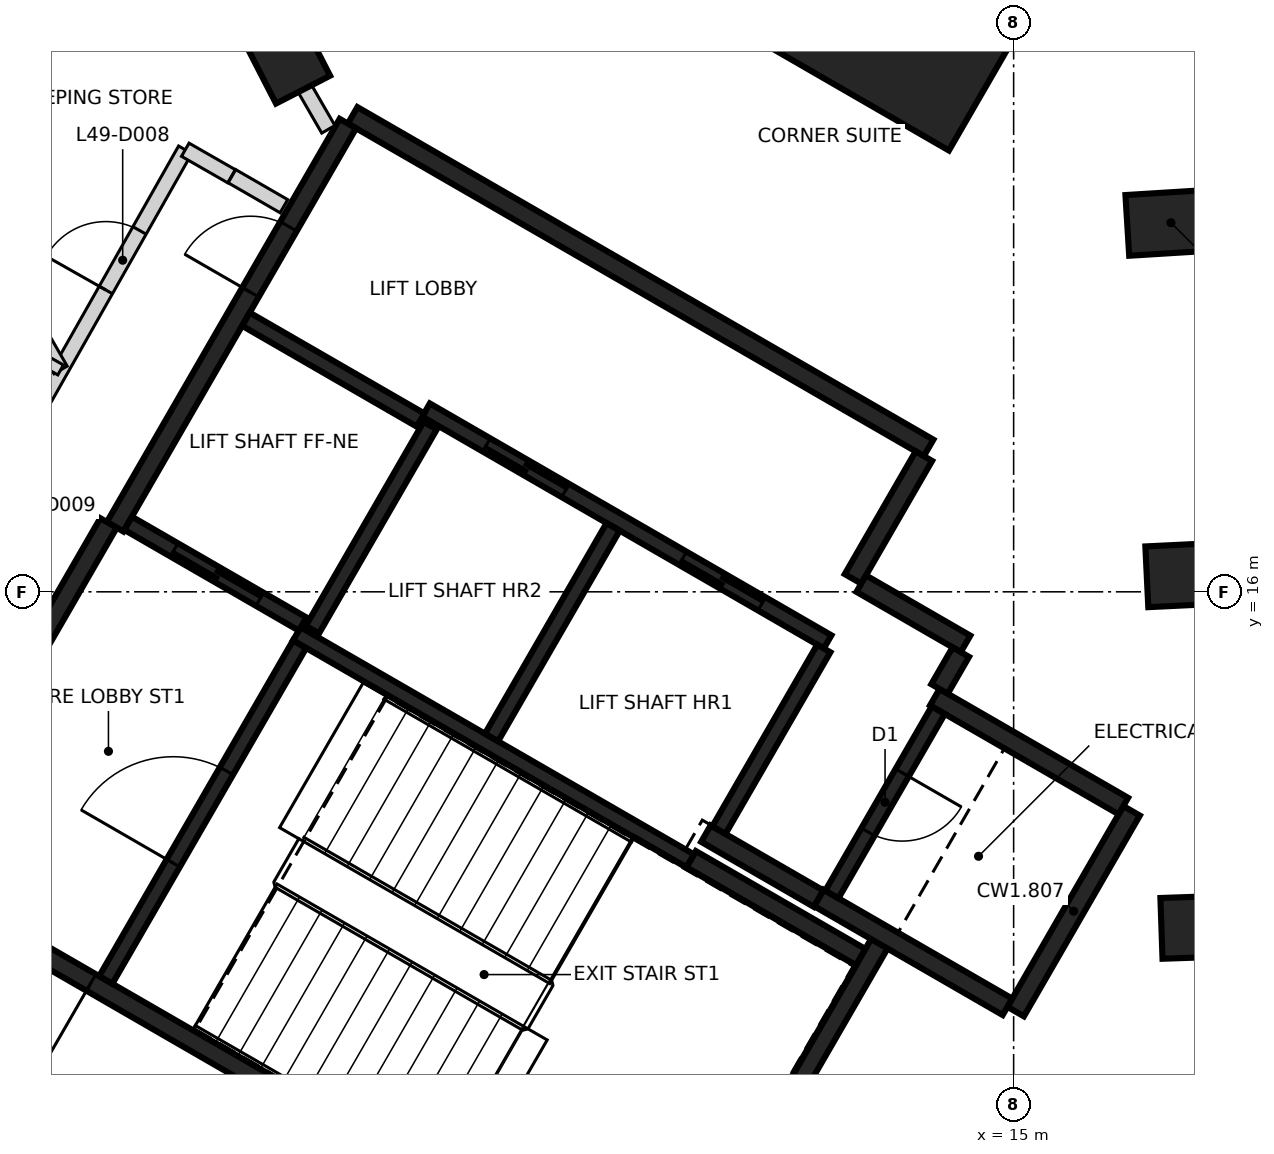
"""IFC4 building model, lengths in metres.
Left out: names, types, materials, properties, quantities, classifications, styles, units other than length and angle.
Written with IfcOpenShell. Run it as: python <this file> out.ifc"""

import sys

from ifc_helpers import new_model, si_unit, direction, frame, frame_2d, origin, origin_2d, place, context, subcontext, project, spatial, rectangle, extrude, element, fill, save


model = new_model("IFC4")
c1 = context("Model", 3, precision=1e-05, world=origin(), true_north=direction((0.0, 1.0)))
c2 = subcontext(c1, "Body", "Model", "MODEL_VIEW")
j1 = project(units=[si_unit("LENGTHUNIT", "METRE"), si_unit("PLANEANGLEUNIT", "RADIAN")], contexts=[c1])
p1 = place(None, origin())
s1 = spatial("IfcSite", under=j1, at=p1, CompositionType="ELEMENT")
p2 = place(p1, origin())
s2 = spatial("IfcBuilding", under=s1, at=p2, CompositionType="ELEMENT")
p3 = place(p2, frame((0.0, 0.0, 197.2)))
s3 = spatial("IfcBuildingStorey", under=s2, at=p3, CompositionType="ELEMENT", Elevation=197.2)
for number, where, z_axis, x_axis in (
    (1, (17.519, 11.592, -0.35), (0.0, 0.0, 1.0), (0.999, 0.034, 0.0)),
    (2, (17.326, 16.226, -0.35), (0.0, 0.0, 1.0), (0.999, 0.048, 0.0)),
    (3, (17.07, 20.856, -0.35), (0.0, 0.0, 1.0), (0.998, 0.062, 0.0)),
    (4, (5.388, 23.118, -0.35), (0.0, 0.0, 1.0), (-0.458, 0.889, 0.0)),
):
    element("IfcColumn", number, at=place(p3, frame(where, z_axis=z_axis, x_axis=x_axis)), inside=s3, PredefinedType="COLUMN", context=c2, shape_type="SweptSolid", body=[
        extrude(rectangle(XDim=1.15, YDim=0.8, at=origin_2d()), origin(), (0.0, 0.0, 1.0), 3.6),
    ])
p4 = place(p3, frame((13.78, 23.867, -0.35), z_axis=(0.0, 0.0, 1.0), x_axis=(0.5, 0.866025403784, 0.0)))
e5 = element("IfcColumn", 5, at=p4, inside=s3, PredefinedType="COLUMN", context=c2, shape_type="SweptSolid", body=[
    extrude(rectangle(XDim=3.2, YDim=2.7, at=origin_2d()), origin(), (0.0, 0.0, 1.0), 3.6),
])
p5 = place(p3, frame((10.42, 6.498, 0.0), z_axis=(0.0, 0.0, 1.0), x_axis=(-0.866021906294, 0.500006057782, 0.0)))
e6 = element("IfcWall", 6, at=p5, inside=s3, PredefinedType="SHEAR", context=c2, shape_type="SweptSolid", body=[
    extrude(rectangle(XDim=11.55, YDim=0.25, at=frame_2d((5.775, 0.0))), origin(), (0.0, 0.0, 1.0), 3.25),
])
p6 = place(p5, frame((10.025, 0.0, 0.0)))
e7 = element("IfcOpeningElement", 7, at=p6, cuts=e6, PredefinedType="OPENING", context=c2, shape_type="SweptSolid", body=[
    extrude(rectangle(XDim=1.2, YDim=2.1, at=frame_2d((0.6, 1.05))), frame((0.0, 0.135, 0.0), z_axis=(0.0, -1.0, 0.0), x_axis=(1.0, 0.0, 0.0)), (0.0, 0.0, 1.0), 0.27),
])
p7 = place(p5, frame((8.725, 0.0, 0.0)))
e8 = element("IfcOpeningElement", 8, at=p7, cuts=e6, PredefinedType="OPENING", context=c2, shape_type="SweptSolid", body=[
    extrude(rectangle(XDim=1.2, YDim=2.1, at=frame_2d((0.6, 1.05))), frame((0.0, 0.135, 0.0), z_axis=(0.0, -1.0, 0.0), x_axis=(1.0, 0.0, 0.0)), (0.0, 0.0, 1.0), 0.27),
])
p8 = place(p3, frame((6.304, 22.269, 0.0), z_axis=(0.0, 0.0, 1.0), x_axis=(0.866022959057, -0.500004234368, 0.0)))
e9 = element("IfcWall", 9, at=p8, inside=s3, PredefinedType="SHEAR", context=c2, shape_type="SweptSolid", body=[
    extrude(rectangle(XDim=8.75, YDim=0.25, at=frame_2d((4.375, 0.0))), origin(), (0.0, 0.0, 1.0), 3.25),
])
p9 = place(p3, frame((3.179, 16.856, 0.0), z_axis=(0.0, 0.0, 1.0), x_axis=(0.500001955336, 0.866024274868, 0.0)))
e10 = element("IfcWall", 10, at=p9, inside=s3, PredefinedType="SHEAR", context=c2, shape_type="SweptSolid", body=[
    extrude(rectangle(XDim=6.125, YDim=0.25, at=frame_2d((3.062, 0.0))), origin(), (0.0, 0.0, 1.0), 3.25),
])
p10 = place(p9, frame((3.563, 0.0, 0.0)))
e11 = element("IfcOpeningElement", 11, at=p10, cuts=e10, PredefinedType="OPENING", context=c2, shape_type="SweptSolid", body=[
    extrude(rectangle(XDim=1.0, YDim=2.1, at=frame_2d((0.5, 1.05))), frame((0.0, 0.135, 0.0), z_axis=(0.0, -1.0, 0.0), x_axis=(1.0, 0.0, 0.0)), (0.0, 0.0, 1.0), 0.27),
])
p11 = place(p3, frame((0.48, 12.381, 0.0), z_axis=(0.0, 0.0, 1.0), x_axis=(0.49999885962, 0.866026062182, 0.0)))
e12 = element("IfcWall", 12, at=p11, inside=s3, PredefinedType="SHEAR", context=c2, shape_type="SweptSolid", body=[
    extrude(rectangle(XDim=5.225, YDim=0.25, at=frame_2d((2.612, 0.0))), origin(), (0.0, 0.0, 1.0), 3.25),
])
p12 = place(p3, frame((13.238, 11.378, 0.0), z_axis=(0.0, 0.0, 1.0), x_axis=(-0.500008851346, -0.866020293397, 0.0)))
e13 = element("IfcWall", 13, at=p12, inside=s3, PredefinedType="SHEAR", context=c2, shape_type="SweptSolid", body=[
    extrude(rectangle(XDim=5.51, YDim=0.25, at=frame_2d((2.755, 0.0))), origin(), (0.0, 0.0, 1.0), 3.25),
])
p13 = place(p3, frame((16.552, 13.119, 0.0), z_axis=(0.0, 0.0, 1.0), x_axis=(-0.499978833458, -0.866037623948, 0.0)))
e14 = element("IfcWall", 14, at=p13, inside=s3, PredefinedType="SHEAR", context=c2, shape_type="SweptSolid", body=[
    extrude(rectangle(XDim=3.05, YDim=0.25, at=frame_2d((1.525, 0.0))), origin(), (0.0, 0.0, 1.0), 3.25),
])
p14 = place(p3, frame((14.918, 10.54, 0.0), z_axis=(0.0, 0.0, 1.0), x_axis=(-0.866063538972, 0.499933942099, 0.0)))
e15 = element("IfcWall", 15, at=p14, inside=s3, PredefinedType="SHEAR", context=c2, shape_type="SweptSolid", body=[
    extrude(rectangle(XDim=2.865, YDim=0.25, at=frame_2d((1.432, 0.0))), origin(), (0.0, 0.0, 1.0), 3.25),
])
p15 = place(p3, frame((13.963, 14.614, 0.0), z_axis=(0.0, 0.0, 1.0), x_axis=(0.866042235819, -0.499970844928, 0.0)))
e16 = element("IfcWall", 16, at=p15, inside=s3, PredefinedType="SHEAR", context=c2, shape_type="SweptSolid", body=[
    extrude(rectangle(XDim=2.865, YDim=0.25, at=frame_2d((1.432, 0.0))), origin(), (0.0, 0.0, 1.0), 3.25),
])
p16 = place(p3, frame((10.757, 12.481, 0.0), z_axis=(0.0, 0.0, 1.0), x_axis=(0.866022940537, -0.500004266446, 0.0)))
e17 = element("IfcWall", 17, at=p16, inside=s3, PredefinedType="SHEAR", context=c2, shape_type="SweptSolid", body=[
    extrude(rectangle(XDim=2.575, YDim=0.25, at=frame_2d((1.287, 0.0))), origin(), (0.0, 0.0, 1.0), 3.25),
])
p17 = place(p3, frame((13.819, 17.785, 0.0), z_axis=(0.0, 0.0, 1.0), x_axis=(-0.500039802285, -0.866002422705, 0.0)))
e18 = element("IfcWall", 18, at=p17, inside=s3, PredefinedType="SHEAR", context=c2, shape_type="SweptSolid", body=[
    extrude(rectangle(XDim=1.865, YDim=0.25, at=frame_2d((0.932, 0.0))), origin(), (0.0, 0.0, 1.0), 3.25),
])
p18 = place(p3, frame((12.433, 11.964, 0.0), z_axis=(0.0, 0.0, 1.0), x_axis=(-0.866038183914, 0.499977863513, 0.0)))
e19 = element("IfcWall", 19, at=p18, inside=s3, PredefinedType="SHEAR", context=c2, shape_type="SweptSolid", body=[
    extrude(rectangle(XDim=1.71, YDim=0.25, at=frame_2d((0.855, 0.0))), origin(), (0.0, 0.0, 1.0), 3.25),
])
p19 = place(p3, frame((12.995, 16.108, 0.0), z_axis=(0.0, 0.0, 1.0), x_axis=(0.866044474677, -0.49996696679, 0.0)))
e20 = element("IfcWall", 20, at=p19, inside=s3, PredefinedType="SHEAR", context=c2, shape_type="SweptSolid", body=[
    extrude(rectangle(XDim=1.584, YDim=0.25, at=frame_2d((0.792, 0.0))), origin(), (0.0, 0.0, 1.0), 3.25),
])
p20 = place(p3, frame((14.305, 15.207, 0.0), z_axis=(0.0, 0.0, 1.0), x_axis=(-0.499848422343, -0.866112899501, 0.0)))
e21 = element("IfcWall", 21, at=p20, inside=s3, PredefinedType="SHEAR", context=c2, shape_type="SweptSolid", body=[
    extrude(rectangle(XDim=0.559, YDim=0.25, at=frame_2d((0.28, 0.0))), origin(), (0.0, 0.0, 1.0), 3.25),
])
p21 = place(p3, frame((12.552, 15.342, 0.0), z_axis=(0.0, 0.0, 1.0), x_axis=(-0.866030299012, 0.499991521122, 0.0)))
e22 = element("IfcWall", 22, at=p21, inside=s3, PredefinedType="SHEAR", context=c2, shape_type="SweptSolid", body=[
    extrude(rectangle(XDim=6.1, YDim=0.2, at=frame_2d((3.05, 0.0))), origin(), (0.0, 0.0, 1.0), 3.25),
])
p22 = place(p21, frame((1.0, 0.0, 0.0)))
e23 = element("IfcOpeningElement", 23, at=p22, cuts=e22, PredefinedType="OPENING", context=c2, shape_type="SweptSolid", body=[
    extrude(rectangle(XDim=1.2, YDim=2.1, at=frame_2d((0.6, 1.05))), frame((0.0, 0.11, 0.0), z_axis=(0.0, -1.0, 0.0), x_axis=(1.0, 0.0, 0.0)), (0.0, 0.0, 1.0), 0.22),
])
p23 = place(p21, frame((3.982, 0.0, 0.0)))
e24 = element("IfcOpeningElement", 24, at=p23, cuts=e22, PredefinedType="OPENING", context=c2, shape_type="SweptSolid", body=[
    extrude(rectangle(XDim=1.2, YDim=2.1, at=frame_2d((0.6, 1.05))), frame((0.0, 0.11, 0.0), z_axis=(0.0, -1.0, 0.0), x_axis=(1.0, 0.0, 0.0)), (0.0, 0.0, 1.0), 0.22),
])
p24 = place(p3, frame((10.743, 12.46, 0.0), z_axis=(0.0, 0.0, 1.0), x_axis=(-0.866018848283, 0.500011354289, 0.0)))
e25 = element("IfcWall", 25, at=p24, inside=s3, PredefinedType="SHEAR", context=c2, shape_type="SweptSolid", body=[
    extrude(rectangle(XDim=5.974, YDim=0.2, at=frame_2d((2.987, 0.0))), origin(), (0.0, 0.0, 1.0), 3.25),
])
p25 = place(p3, frame((3.057, 10.895, 0.0), z_axis=(0.0, 0.0, 1.0), x_axis=(0.500027839223, 0.866009330205, 0.0)))
e26 = element("IfcWall", 26, at=p25, inside=s3, PredefinedType="SHEAR", context=c2, shape_type="SweptSolid", body=[
    extrude(rectangle(XDim=5.098, YDim=0.2, at=frame_2d((2.549, 0.0))), origin(), (0.0, 0.0, 1.0), 3.25),
])
p26 = place(p25, frame((1.774, 0.0, 0.0)))
e27 = element("IfcOpeningElement", 27, at=p26, cuts=e26, PredefinedType="OPENING", context=c2, shape_type="SweptSolid", body=[
    extrude(rectangle(XDim=1.4, YDim=2.1, at=frame_2d((0.7, 1.05))), frame((0.0, 0.11, 0.0), z_axis=(0.0, -1.0, 0.0), x_axis=(1.0, 0.0, 0.0)), (0.0, 0.0, 1.0), 0.22),
])
p27 = place(p3, frame((8.132, 14.084, 0.0), z_axis=(0.0, 0.0, 1.0), x_axis=(0.500030834389, 0.86600760081, 0.0)))
e28 = element("IfcWall", 28, at=p27, inside=s3, PredefinedType="SHEAR", context=c2, shape_type="SweptSolid", body=[
    extrude(rectangle(XDim=3.198, YDim=0.2, at=frame_2d((1.599, 0.0))), origin(), (0.0, 0.0, 1.0), 3.25),
])
p28 = place(p3, frame((14.008, 14.442, 0.0), z_axis=(0.0, 0.0, 1.0), x_axis=(-0.499986818241, -0.866033014143, 0.0)))
e29 = element("IfcWall", 29, at=p28, inside=s3, PredefinedType="SHEAR", context=c2, shape_type="SweptSolid", body=[
    extrude(rectangle(XDim=2.798, YDim=0.2, at=frame_2d((1.399, 0.0))), origin(), (0.0, 0.0, 1.0), 3.25),
])
p29 = place(p28, frame((0.949, 0.0, 0.0)))
e30 = element("IfcOpeningElement", 30, at=p29, cuts=e29, PredefinedType="OPENING", context=c2, shape_type="SweptSolid", body=[
    extrude(rectangle(XDim=0.9, YDim=2.1, at=frame_2d((0.45, 1.05))), frame((0.0, 0.11, 0.0), z_axis=(0.0, -1.0, 0.0), x_axis=(1.0, 0.0, 0.0)), (0.0, 0.0, 1.0), 0.22),
])
p30 = place(p3, frame((12.502, 15.255, 0.0), z_axis=(0.0, 0.0, 1.0), x_axis=(-0.499965018551, -0.866045599391, 0.0)))
e31 = element("IfcWall", 31, at=p30, inside=s3, PredefinedType="SHEAR", context=c2, shape_type="SweptSolid", body=[
    extrude(rectangle(XDim=2.759, YDim=0.2, at=frame_2d((1.379, 0.0))), origin(), (0.0, 0.0, 1.0), 3.25),
])
p31 = place(p3, frame((7.324, 18.187, 0.0), z_axis=(0.0, 0.0, 1.0), x_axis=(-0.499967891604, -0.866043940782, 0.0)))
e32 = element("IfcWall", 32, at=p31, inside=s3, PredefinedType="SHEAR", context=c2, shape_type="SweptSolid", body=[
    extrude(rectangle(XDim=3.1, YDim=0.2, at=frame_2d((1.55, 0.0))), origin(), (0.0, 0.0, 1.0), 3.25),
])
p32 = place(p3, frame((5.646, 15.576, 0.0), z_axis=(0.0, 0.0, 1.0), x_axis=(-0.866018407898, 0.500012117035, 0.0)))
e33 = element("IfcWall", 33, at=p32, inside=s3, PredefinedType="SHEAR", context=c2, shape_type="SweptSolid", body=[
    extrude(rectangle(XDim=2.651, YDim=0.2, at=frame_2d((1.325, 0.0))), origin(), (0.0, 0.0, 1.0), 3.25),
])
p33 = place(p32, frame((0.652, 0.0, 0.0)))
e34 = element("IfcOpeningElement", 34, at=p33, cuts=e33, PredefinedType="OPENING", context=c2, shape_type="SweptSolid", body=[
    extrude(rectangle(XDim=1.3, YDim=2.1, at=frame_2d((0.65, 1.05))), frame((0.0, 0.11, 0.0), z_axis=(0.0, -1.0, 0.0), x_axis=(1.0, 0.0, 0.0)), (0.0, 0.0, 1.0), 0.22),
])
p34 = place(p3, frame((7.196, 18.26, 0.0), z_axis=(0.0, 0.0, 1.0), x_axis=(-0.866018407898, 0.500012117035, 0.0)))
e35 = element("IfcWall", 35, at=p34, inside=s3, PredefinedType="SHEAR", context=c2, shape_type="SweptSolid", body=[
    extrude(rectangle(XDim=2.651, YDim=0.2, at=frame_2d((1.325, 0.0))), origin(), (0.0, 0.0, 1.0), 3.25),
])
p35 = place(p3, frame((-1.086, 12.65, 0.0), z_axis=(0.0, 0.0, 1.0), x_axis=(0.492507119433, 0.870308415051, 0.0)))
e36 = element("IfcWall", 36, at=p35, inside=s3, PredefinedType="PARTITIONING", context=c2, shape_type="SweptSolid", body=[
    extrude(rectangle(XDim=10.531, YDim=0.2, at=frame_2d((5.266, 0.0))), origin(), (0.0, 0.0, 1.0), 3.25),
])
p36 = place(p35, frame((8.411, 0.0, 0.0)))
e37 = element("IfcOpeningElement", 37, at=p36, cuts=e36, PredefinedType="OPENING", context=c2, shape_type="SweptSolid", body=[
    extrude(rectangle(XDim=0.9, YDim=2.1, at=frame_2d((0.45, 1.05))), frame((0.0, 0.11, 0.0), z_axis=(0.0, -1.0, 0.0), x_axis=(1.0, 0.0, 0.0)), (0.0, 0.0, 1.0), 0.22),
])
p37 = place(p35, frame((3.664, 0.0, 0.0)))
e38 = element("IfcOpeningElement", 38, at=p37, cuts=e36, PredefinedType="OPENING", context=c2, shape_type="SweptSolid", body=[
    extrude(rectangle(XDim=0.95, YDim=2.1, at=frame_2d((0.475, 1.05))), frame((0.0, 0.11, 0.0), z_axis=(0.0, -1.0, 0.0), x_axis=(1.0, 0.0, 0.0)), (0.0, 0.0, 1.0), 0.22),
])
p38 = place(p3, frame((4.102, 21.816, 0.0), z_axis=(0.0, 0.0, 1.0), x_axis=(0.867664502326, -0.497150189986, 0.0)))
e39 = element("IfcWall", 39, at=p38, inside=s3, PredefinedType="PARTITIONING", context=c2, shape_type="SweptSolid", body=[
    extrude(rectangle(XDim=0.702, YDim=0.2, at=frame_2d((0.351, 0.0))), origin(), (0.0, 0.0, 1.0), 3.25),
])
p39 = place(p3, frame((4.716, 21.468, 0.0), z_axis=(0.0, 0.0, 1.0), x_axis=(0.865912682783, -0.500195187698, 0.0)))
e40 = element("IfcWall", 40, at=p39, inside=s3, PredefinedType="PARTITIONING", context=c2, shape_type="SweptSolid", body=[
    extrude(rectangle(XDim=0.79, YDim=0.2, at=frame_2d((0.395, 0.0))), origin(), (0.0, 0.0, 1.0), 3.25),
])
p40 = place(p3, frame((0.076, 23.052, 0.0), z_axis=(0.0, 0.0, 1.0), x_axis=(0.499957131376, -0.866050152581, 0.0)))
e41 = element("IfcWall", 41, at=p40, inside=s3, PredefinedType="PARTITIONING", context=c2, shape_type="SweptSolid", body=[
    extrude(rectangle(XDim=4.773, YDim=0.2, at=frame_2d((2.386, 0.0))), origin(), (0.0, 0.0, 1.0), 3.25),
])
p41 = place(p3, frame((4.184, 25.203, 0.0), z_axis=(0.0, 0.0, 1.0), x_axis=(0.4998731114, -0.866098650558, 0.0)))
e42 = element("IfcWall", 42, at=p41, inside=s3, PredefinedType="PARTITIONING", context=c2, shape_type="SweptSolid", body=[
    extrude(rectangle(XDim=3.601, YDim=0.2, at=frame_2d((1.8, 0.0))), origin(), (0.0, 0.0, 1.0), 3.25),
])
p42 = place(p3, frame((0.373, 20.101, 0.0), z_axis=(0.0, 0.0, 1.0), x_axis=(0.870301279559, -0.492519728334, 0.0)))
e43 = element("IfcWall", 43, at=p42, inside=s3, PredefinedType="PARTITIONING", context=c2, shape_type="SweptSolid", body=[
    extrude(rectangle(XDim=2.4, YDim=0.15, at=frame_2d((1.2, 0.0))), origin(), (0.0, 0.0, 1.0), 3.25),
])
p43 = place(p33, origin())
e44 = element("IfcDoor", 44, at=p43, inside=s3, OperationType="SLIDING_TO_RIGHT", PredefinedType="DOOR", context=c2, shape_type="SweptSolid", body=[
    extrude(rectangle(XDim=1.3, YDim=2.1, at=frame_2d((0.65, 1.05))), frame((0.0, 0.025, 0.0), z_axis=(0.0, -1.0, 0.0), x_axis=(1.0, 0.0, 0.0)), (0.0, 0.0, 1.0), 0.05),
])
fill(e34, e44)
p44 = place(p22, origin())
e45 = element("IfcDoor", 45, at=p44, inside=s3, OperationType="DOUBLE_DOOR_SLIDING", PredefinedType="DOOR", context=c2, shape_type="SweptSolid", body=[
    extrude(rectangle(XDim=1.2, YDim=2.1, at=frame_2d((0.6, 1.05))), frame((0.0, 0.025, 0.0), z_axis=(0.0, -1.0, 0.0), x_axis=(1.0, 0.0, 0.0)), (0.0, 0.0, 1.0), 0.05),
])
fill(e23, e45)
p45 = place(p23, origin())
e46 = element("IfcDoor", 46, at=p45, inside=s3, OperationType="DOUBLE_DOOR_SLIDING", PredefinedType="DOOR", context=c2, shape_type="SweptSolid", body=[
    extrude(rectangle(XDim=1.2, YDim=2.1, at=frame_2d((0.6, 1.05))), frame((0.0, 0.025, 0.0), z_axis=(0.0, -1.0, 0.0), x_axis=(1.0, 0.0, 0.0)), (0.0, 0.0, 1.0), 0.05),
])
fill(e24, e46)
p46 = place(p10, origin())
e47 = element("IfcDoor", 47, at=p46, inside=s3, OperationType="SINGLE_SWING_LEFT", PredefinedType="DOOR", context=c2, shape_type="SweptSolid", body=[
    extrude(rectangle(XDim=1.0, YDim=2.1, at=frame_2d((0.5, 1.05))), frame((0.0, 0.025, 0.0), z_axis=(0.0, -1.0, 0.0), x_axis=(1.0, 0.0, 0.0)), (0.0, 0.0, 1.0), 0.05),
])
fill(e11, e47)
p47 = place(p7, origin())
e48 = element("IfcDoor", 48, at=p47, inside=s3, OperationType="SINGLE_SWING_RIGHT", PredefinedType="DOOR", context=c2, shape_type="SweptSolid", body=[
    extrude(rectangle(XDim=1.2, YDim=2.1, at=frame_2d((0.6, 1.05))), frame((0.0, 0.025, 0.0), z_axis=(0.0, -1.0, 0.0), x_axis=(1.0, 0.0, 0.0)), (0.0, 0.0, 1.0), 0.05),
])
fill(e8, e48)
p48 = place(p26, origin())
e49 = element("IfcDoor", 49, at=p48, inside=s3, OperationType="SINGLE_SWING_RIGHT", PredefinedType="DOOR", context=c2, shape_type="SweptSolid", body=[
    extrude(rectangle(XDim=1.4, YDim=2.1, at=frame_2d((0.7, 1.05))), frame((0.0, 0.025, 0.0), z_axis=(0.0, -1.0, 0.0), x_axis=(1.0, 0.0, 0.0)), (0.0, 0.0, 1.0), 0.05),
])
fill(e27, e49)
p49 = place(p29, origin())
e50 = element("IfcDoor", 50, at=p49, inside=s3, OperationType="SINGLE_SWING_LEFT", PredefinedType="DOOR", context=c2, shape_type="SweptSolid", body=[
    extrude(rectangle(XDim=0.9, YDim=2.1, at=frame_2d((0.45, 1.05))), frame((0.0, 0.025, 0.0), z_axis=(0.0, -1.0, 0.0), x_axis=(1.0, 0.0, 0.0)), (0.0, 0.0, 1.0), 0.05),
])
fill(e30, e50)
p50 = place(p36, origin())
e51 = element("IfcDoor", 51, at=p50, inside=s3, OperationType="SINGLE_SWING_LEFT", PredefinedType="DOOR", context=c2, shape_type="SweptSolid", body=[
    extrude(rectangle(XDim=0.9, YDim=2.1, at=frame_2d((0.45, 1.05))), frame((0.0, 0.025, 0.0), z_axis=(0.0, -1.0, 0.0), x_axis=(1.0, 0.0, 0.0)), (0.0, 0.0, 1.0), 0.05),
])
fill(e37, e51)
save(model, sys.argv[1])
